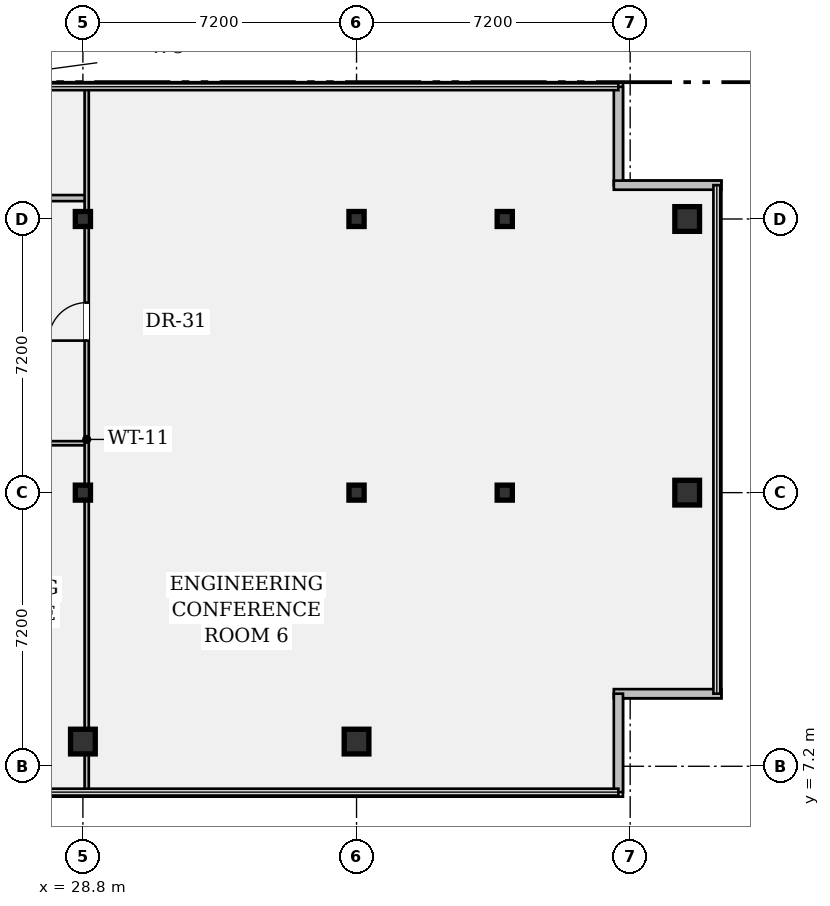
"""IFC4 building model, lengths in metres.
Left out: names, types, materials, properties, quantities, classifications, styles, units other than length and angle.
Written with IfcOpenShell. Run it as: python <this file> out.ifc"""

import sys

from ifc_helpers import new_model, si_unit, direction, frame, frame_2d, origin, origin_2d, place, context, subcontext, project, spatial, rectangle, hollow_rectangle, i_section, extrude, element, fill, save


model = new_model("IFC4")
c1 = context("Model", 3, precision=1e-05, world=origin(), true_north=direction((0.0, 1.0)))
c2 = subcontext(c1, "Body", "Model", "MODEL_VIEW")
j1 = project(units=[si_unit("LENGTHUNIT", "METRE"), si_unit("PLANEANGLEUNIT", "RADIAN")], contexts=[c1])
p1 = place(None, origin())
s1 = spatial("IfcSite", under=j1, at=p1, CompositionType="ELEMENT")
p2 = place(p1, origin())
s2 = spatial("IfcBuilding", under=s1, at=p2, CompositionType="ELEMENT")
p3 = place(p2, frame((0.0, 0.0, 265.65)))
s3 = spatial("IfcBuildingStorey", under=s2, at=p3, CompositionType="ELEMENT", Elevation=265.65)
p4 = place(p3, frame((28.8, 7.85, 0.0), z_axis=(0.0, 0.0, 1.0), x_axis=(1.0, 0.0, 0.0)))
e1 = element("IfcColumn", 1, at=p4, inside=s3, PredefinedType="COLUMN", context=c2, shape_type="SweptSolid", body=[
    extrude(hollow_rectangle(XDim=0.65, YDim=0.65, WallThickness=0.04, at=origin_2d()), origin(), (0.0, 0.0, 1.0), 3.24),
])
for number, where, z_axis, x_axis in (
    (2, (28.8, 14.4, 0.0), (0.0, 0.0, 1.0), (1.0, 0.0, 0.0)),
    (3, (28.8, 21.6, 0.0), (0.0, 0.0, 1.0), (1.0, 0.0, 0.0)),
):
    element("IfcColumn", number, at=place(p3, frame(where, z_axis=z_axis, x_axis=x_axis)), inside=s3, PredefinedType="COLUMN", context=c2, shape_type="SweptSolid", body=[
        extrude(i_section(OverallWidth=0.399, OverallDepth=0.394, WebThickness=0.023, FlangeThickness=0.037, FilletRadius=0.018, at=origin_2d()), origin(), (0.0, 0.0, 1.0), 3.24),
    ])
p5 = place(p3, frame((36.0, 7.85, 0.0), z_axis=(0.0, 0.0, 1.0), x_axis=(1.0, 0.0, 0.0)))
e4 = element("IfcColumn", 4, at=p5, inside=s3, PredefinedType="COLUMN", context=c2, shape_type="SweptSolid", body=[
    extrude(hollow_rectangle(XDim=0.65, YDim=0.65, WallThickness=0.04, at=origin_2d()), origin(), (0.0, 0.0, 1.0), 3.24),
])
for number, where, z_axis, x_axis in (
    (5, (36.0, 14.4, 0.0), (0.0, 0.0, 1.0), (1.0, 0.0, 0.0)),
    (6, (36.0, 21.6, 0.0), (0.0, 0.0, 1.0), (1.0, 0.0, 0.0)),
    (7, (39.9, 14.4, 0.0), (0.0, 0.0, 1.0), (1.0, 0.0, 0.0)),
    (8, (39.9, 21.6, 0.0), (0.0, 0.0, 1.0), (1.0, 0.0, 0.0)),
):
    element("IfcColumn", number, at=place(p3, frame(where, z_axis=z_axis, x_axis=x_axis)), inside=s3, PredefinedType="COLUMN", context=c2, shape_type="SweptSolid", body=[
        extrude(i_section(OverallWidth=0.399, OverallDepth=0.394, WebThickness=0.023, FlangeThickness=0.037, FilletRadius=0.018, at=origin_2d()), origin(), (0.0, 0.0, 1.0), 3.24),
    ])
for number, where, z_axis, x_axis in (
    (9, (44.7, 14.4, 0.0), (0.0, 0.0, 1.0), (1.0, 0.0, 0.0)),
    (10, (44.7, 21.6, 0.0), (0.0, 0.0, 1.0), (1.0, 0.0, 0.0)),
):
    element("IfcColumn", number, at=place(p3, frame(where, z_axis=z_axis, x_axis=x_axis)), inside=s3, PredefinedType="COLUMN", context=c2, shape_type="SweptSolid", body=[
        extrude(hollow_rectangle(XDim=0.65, YDim=0.65, WallThickness=0.04, at=origin_2d()), origin(), (0.0, 0.0, 1.0), 3.24),
    ])
p6 = place(p3, frame((42.89, 25.08, 0.0), z_axis=(0.0, 0.0, 1.0), x_axis=(0.0, -1.0, 0.0)))
e11 = element("IfcWall", 11, at=p6, inside=s3, PredefinedType="STANDARD", context=c2, shape_type="SweptSolid", body=[
    extrude(rectangle(XDim=2.59, YDim=0.24, at=frame_2d((1.295, 0.0))), origin(), (0.0, 0.0, 1.0), 3.24),
])
for number, where, z_axis, x_axis in (
    (12, (42.77, 22.49, 0.0), (0.0, 0.0, 1.0), (1.0, 0.0, 0.0)),
    (13, (45.6, 9.11, 0.0), (0.0, 0.0, 1.0), (-1.0, 0.0, 0.0)),
):
    element("IfcWall", number, at=place(p3, frame(where, z_axis=z_axis, x_axis=x_axis)), inside=s3, PredefinedType="STANDARD", context=c2, shape_type="SweptSolid", body=[
        extrude(rectangle(XDim=2.83, YDim=0.24, at=frame_2d((1.415, 0.0))), origin(), (0.0, 0.0, 1.0), 3.24),
    ])
p7 = place(p3, frame((42.89, 9.11, 0.0), z_axis=(0.0, 0.0, 1.0), x_axis=(0.0, -1.0, 0.0)))
e14 = element("IfcWall", 14, at=p7, inside=s3, PredefinedType="STANDARD", context=c2, shape_type="SweptSolid", body=[
    extrude(rectangle(XDim=2.59, YDim=0.24, at=frame_2d((1.295, 0.0))), origin(), (0.0, 0.0, 1.0), 3.24),
])
p8 = place(p3, frame((26.95, 15.7, 0.0), z_axis=(0.0, 0.0, 1.0), x_axis=(1.0, 0.0, 0.0)))
e15 = element("IfcWall", 15, at=p8, inside=s3, PredefinedType="PARTITIONING", context=c2, shape_type="SweptSolid", body=[
    extrude(rectangle(XDim=1.95, YDim=0.11, at=frame_2d((0.975, 0.0))), origin(), (0.0, 0.0, 1.0), 2.676),
])
p9 = place(p3, frame((26.95, 22.15, 0.0), z_axis=(0.0, 0.0, 1.0), x_axis=(1.0, 0.0, 0.0)))
e16 = element("IfcWall", 16, at=p9, inside=s3, PredefinedType="PARTITIONING", context=c2, shape_type="SweptSolid", body=[
    extrude(rectangle(XDim=1.95, YDim=0.16, at=frame_2d((0.975, 0.0))), origin(), (0.0, 0.0, 1.0), 3.24),
])
p10 = place(p3, frame((28.9, 6.52, 0.0), z_axis=(0.0, 0.0, 1.0), x_axis=(0.0, 1.0, 0.0)))
e17 = element("IfcWall", 17, at=p10, inside=s3, PredefinedType="PARTITIONING", context=c2, shape_type="SweptSolid", body=[
    extrude(rectangle(XDim=18.56, YDim=0.11, at=frame_2d((9.28, 0.0))), origin(), (0.0, 0.0, 1.0), 2.676),
])
p11 = place(p10, frame((11.88, 0.0, 0.0)))
e18 = element("IfcOpeningElement", 18, at=p11, cuts=e17, PredefinedType="OPENING", context=c2, shape_type="SweptSolid", body=[
    extrude(rectangle(XDim=1.0, YDim=2.15, at=frame_2d((0.5, 1.075))), frame((0.0, 0.067, 0.0), z_axis=(0.0, -1.0, 0.0), x_axis=(1.0, 0.0, 0.0)), (0.0, 0.0, 1.0), 0.134),
])
p12 = place(p11, origin())
e19 = element("IfcDoor", 19, at=p12, inside=s3, OperationType="SINGLE_SWING_LEFT", PredefinedType="DOOR", context=c2, shape_type="SweptSolid", body=[
    extrude(rectangle(XDim=1.0, YDim=2.15, at=frame_2d((0.5, 1.075))), frame((0.0, 0.025, 0.0), z_axis=(0.0, -1.0, 0.0), x_axis=(1.0, 0.0, 0.0)), (0.0, 0.0, 1.0), 0.05),
])
fill(e18, e19)
save(model, sys.argv[1])
